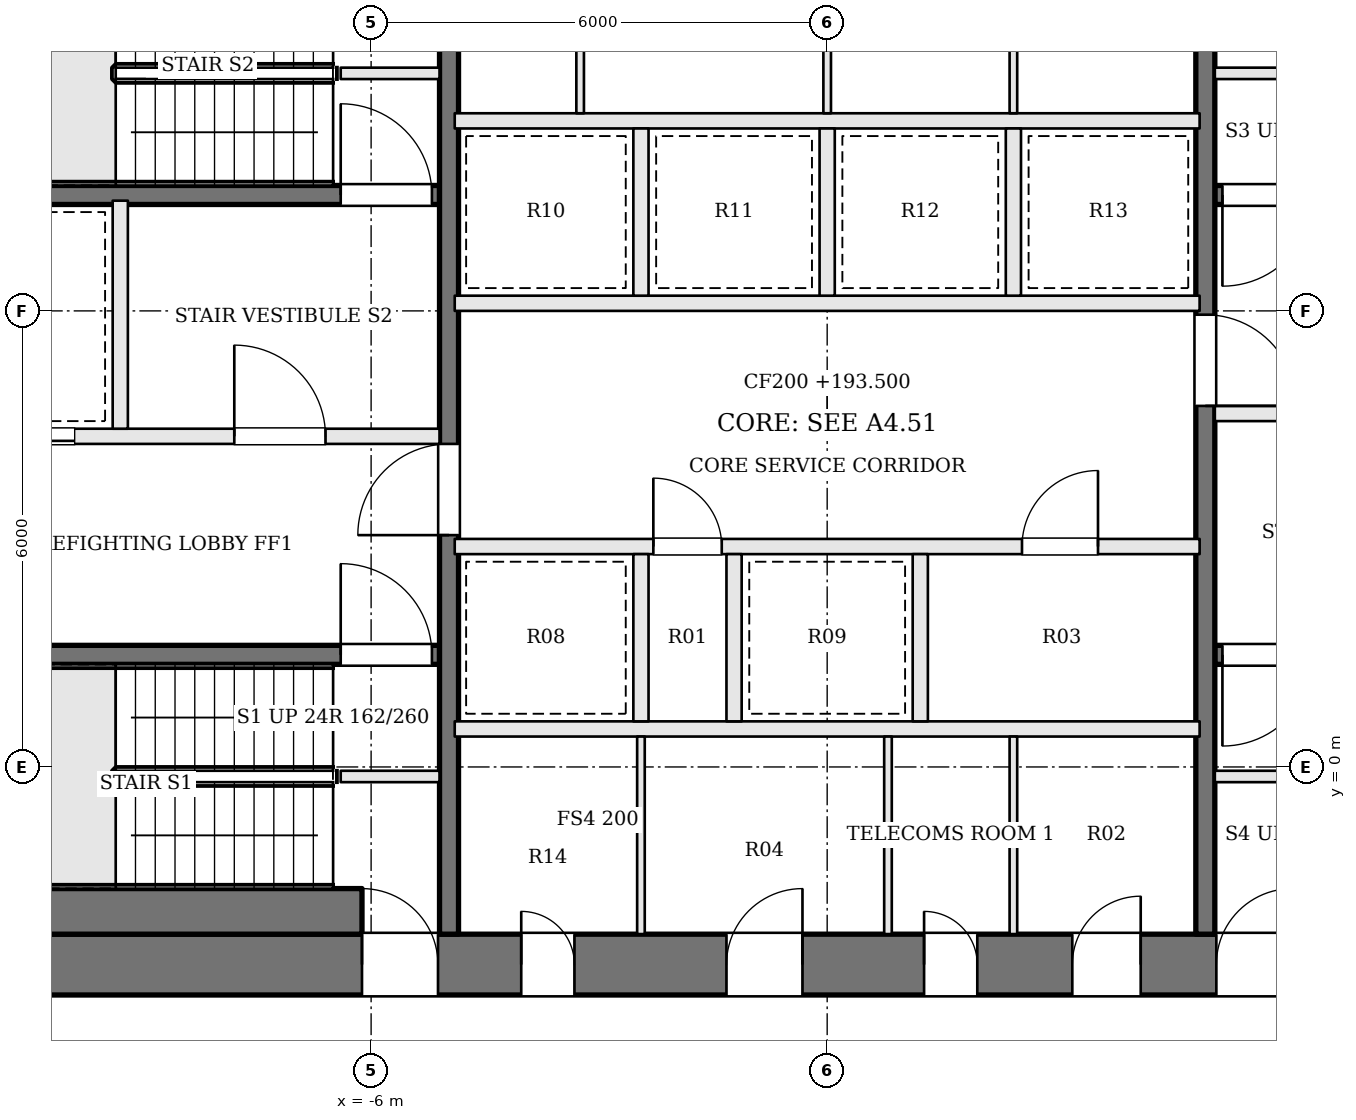
"""IFC4 building model, lengths in metres.
Left out: names, types, materials, properties, quantities, classifications, styles, units other than length and angle.
Written with IfcOpenShell. Run it as: python <this file> out.ifc"""

import sys

from ifc_helpers import new_model, si_unit, direction, frame, frame_2d, origin, place, context, subcontext, project, spatial, rectangle, extrude, element, fill, save


model = new_model("IFC4")
c1 = context("Model", 3, precision=1e-05, world=origin(), true_north=direction((0.0, 1.0)))
c2 = subcontext(c1, "Body", "Model", "MODEL_VIEW")
j1 = project(units=[si_unit("LENGTHUNIT", "METRE"), si_unit("PLANEANGLEUNIT", "RADIAN")], contexts=[c1])
p1 = place(None, origin())
s1 = spatial("IfcSite", under=j1, at=p1, CompositionType="ELEMENT")
p2 = place(p1, origin())
s2 = spatial("IfcBuilding", under=s1, at=p2, CompositionType="ELEMENT")
p3 = place(p2, frame((0.0, 0.0, 193.5)))
s3 = spatial("IfcBuildingStorey", under=s2, at=p3, CompositionType="ELEMENT", Elevation=193.5)
p4 = place(p3, frame((-13.0, -2.6, 0.0), z_axis=(0.0, 0.0, 1.0), x_axis=(1.0, 0.0, 0.0)))
e1 = element("IfcWall", 1, at=p4, inside=s3, PredefinedType="SHEAR", context=c2, shape_type="SweptSolid", body=[
    extrude(rectangle(XDim=26.0, YDim=0.8, at=frame_2d((13.0, 0.0))), origin(), (0.0, 0.0, 1.0), 3.9),
])
p5 = place(p4, frame((8.975, 0.0, 0.0)))
e2 = element("IfcOpeningElement", 2, at=p5, cuts=e1, PredefinedType="OPENING", context=c2, shape_type="SweptSolid", body=[
    extrude(rectangle(XDim=0.7, YDim=2.1, at=frame_2d((0.35, 1.05))), frame((0.0, 0.41, 0.0), z_axis=(0.0, -1.0, 0.0), x_axis=(1.0, 0.0, 0.0)), (0.0, 0.0, 1.0), 0.82),
])
p6 = place(p4, frame((11.675, 0.0, 0.0)))
e3 = element("IfcOpeningElement", 3, at=p6, cuts=e1, PredefinedType="OPENING", context=c2, shape_type="SweptSolid", body=[
    extrude(rectangle(XDim=1.0, YDim=2.1, at=frame_2d((0.5, 1.05))), frame((0.0, 0.41, 0.0), z_axis=(0.0, -1.0, 0.0), x_axis=(1.0, 0.0, 0.0)), (0.0, 0.0, 1.0), 0.82),
])
p7 = place(p4, frame((14.275, 0.0, 0.0)))
e4 = element("IfcOpeningElement", 4, at=p7, cuts=e1, PredefinedType="OPENING", context=c2, shape_type="SweptSolid", body=[
    extrude(rectangle(XDim=0.7, YDim=2.1, at=frame_2d((0.35, 1.05))), frame((0.0, 0.41, 0.0), z_axis=(0.0, -1.0, 0.0), x_axis=(1.0, 0.0, 0.0)), (0.0, 0.0, 1.0), 0.82),
])
p8 = place(p4, frame((16.225, 0.0, 0.0)))
e5 = element("IfcOpeningElement", 5, at=p8, cuts=e1, PredefinedType="OPENING", context=c2, shape_type="SweptSolid", body=[
    extrude(rectangle(XDim=0.9, YDim=2.1, at=frame_2d((0.45, 1.05))), frame((0.0, 0.41, 0.0), z_axis=(0.0, -1.0, 0.0), x_axis=(1.0, 0.0, 0.0)), (0.0, 0.0, 1.0), 0.82),
])
p9 = place(p4, frame((6.88, 0.0, 0.0)))
e6 = element("IfcOpeningElement", 6, at=p9, cuts=e1, PredefinedType="OPENING", context=c2, shape_type="SweptSolid", body=[
    extrude(rectangle(XDim=1.0, YDim=2.1, at=frame_2d((0.5, 1.05))), frame((0.0, 0.41, 0.0), z_axis=(0.0, -1.0, 0.0), x_axis=(1.0, 0.0, 0.0)), (0.0, 0.0, 1.0), 0.82),
])
p10 = place(p4, frame((18.12, 0.0, 0.0)))
e7 = element("IfcOpeningElement", 7, at=p10, cuts=e1, PredefinedType="OPENING", context=c2, shape_type="SweptSolid", body=[
    extrude(rectangle(XDim=1.0, YDim=2.1, at=frame_2d((0.5, 1.05))), frame((0.0, 0.41, 0.0), z_axis=(0.0, -1.0, 0.0), x_axis=(1.0, 0.0, 0.0)), (0.0, 0.0, 1.0), 0.82),
])
for number, where, z_axis, x_axis in (
    (8, (-6.4, -0.125, 0.0), (0.0, 0.0, 1.0), (1.0, 0.0, 0.0)),
    (9, (6.4, 9.125, 0.0), (0.0, 0.0, 1.0), (-1.0, 0.0, 0.0)),
    (10, (-6.4, 9.125, 0.0), (0.0, 0.0, 1.0), (1.0, 0.0, 0.0)),
    (11, (6.4, -0.125, 0.0), (0.0, 0.0, 1.0), (-1.0, 0.0, 0.0)),
):
    element("IfcWall", number, at=place(p3, frame(where, z_axis=z_axis, x_axis=x_axis)), inside=s3, PredefinedType="SOLIDWALL", context=c2, shape_type="SweptSolid", body=[
        extrude(rectangle(XDim=1.3, YDim=0.15, at=frame_2d((0.65, 0.0))), origin(), (0.0, 0.0, 1.0), 3.7),
    ])
p11 = place(p3, frame((-12.2, 1.475, 0.0), z_axis=(0.0, 0.0, 1.0), x_axis=(1.0, 0.0, 0.0)))
e12 = element("IfcWall", 12, at=p11, inside=s3, PredefinedType="SOLIDWALL", context=c2, shape_type="SweptSolid", body=[
    extrude(rectangle(XDim=7.1, YDim=0.25, at=frame_2d((3.55, 0.0))), origin(), (0.0, 0.0, 1.0), 3.7),
])
p12 = place(p11, frame((5.8, 0.0, 0.0)))
e13 = element("IfcOpeningElement", 13, at=p12, cuts=e12, PredefinedType="OPENING", context=c2, shape_type="SweptSolid", body=[
    extrude(rectangle(XDim=1.2, YDim=2.1, at=frame_2d((0.6, 1.05))), frame((0.0, 0.135, 0.0), z_axis=(0.0, -1.0, 0.0), x_axis=(1.0, 0.0, 0.0)), (0.0, 0.0, 1.0), 0.27),
])
p13 = place(p3, frame((12.2, 7.525, 0.0), z_axis=(0.0, 0.0, 1.0), x_axis=(-1.0, 0.0, 0.0)))
e14 = element("IfcWall", 14, at=p13, inside=s3, PredefinedType="SOLIDWALL", context=c2, shape_type="SweptSolid", body=[
    extrude(rectangle(XDim=7.1, YDim=0.25, at=frame_2d((3.55, 0.0))), origin(), (0.0, 0.0, 1.0), 3.7),
])
p14 = place(p13, frame((5.8, 0.0, 0.0)))
e15 = element("IfcOpeningElement", 15, at=p14, cuts=e14, PredefinedType="OPENING", context=c2, shape_type="SweptSolid", body=[
    extrude(rectangle(XDim=1.2, YDim=2.1, at=frame_2d((0.6, 1.05))), frame((0.0, 0.135, 0.0), z_axis=(0.0, -1.0, 0.0), x_axis=(1.0, 0.0, 0.0)), (0.0, 0.0, 1.0), 0.27),
])
p15 = place(p3, frame((-12.2, 4.35, 0.0), z_axis=(0.0, 0.0, 1.0), x_axis=(1.0, 0.0, 0.0)))
e16 = element("IfcWall", 16, at=p15, inside=s3, PredefinedType="SOLIDWALL", context=c2, shape_type="SweptSolid", body=[
    extrude(rectangle(XDim=7.1, YDim=0.2, at=frame_2d((3.55, 0.0))), origin(), (0.0, 0.0, 1.0), 3.7),
])
p16 = place(p15, frame((4.4, 0.0, 0.0)))
e17 = element("IfcOpeningElement", 17, at=p16, cuts=e16, PredefinedType="OPENING", context=c2, shape_type="SweptSolid", body=[
    extrude(rectangle(XDim=1.2, YDim=2.1, at=frame_2d((0.6, 1.05))), frame((0.0, 0.11, 0.0), z_axis=(0.0, -1.0, 0.0), x_axis=(1.0, 0.0, 0.0)), (0.0, 0.0, 1.0), 0.22),
])
p17 = place(p15, frame((1.1, 0.0, 0.0)))
e18 = element("IfcOpeningElement", 18, at=p17, cuts=e16, PredefinedType="OPENING", context=c2, shape_type="SweptSolid", body=[
    extrude(rectangle(XDim=1.2, YDim=2.1, at=frame_2d((0.6, 1.05))), frame((0.0, 0.11, 0.0), z_axis=(0.0, -1.0, 0.0), x_axis=(1.0, 0.0, 0.0)), (0.0, 0.0, 1.0), 0.22),
])
p18 = place(p3, frame((12.2, 4.65, 0.0), z_axis=(0.0, 0.0, 1.0), x_axis=(-1.0, 0.0, 0.0)))
e19 = element("IfcWall", 19, at=p18, inside=s3, PredefinedType="SOLIDWALL", context=c2, shape_type="SweptSolid", body=[
    extrude(rectangle(XDim=7.1, YDim=0.2, at=frame_2d((3.55, 0.0))), origin(), (0.0, 0.0, 1.0), 3.7),
])
p19 = place(p18, frame((4.4, 0.0, 0.0)))
e20 = element("IfcOpeningElement", 20, at=p19, cuts=e19, PredefinedType="OPENING", context=c2, shape_type="SweptSolid", body=[
    extrude(rectangle(XDim=1.2, YDim=2.1, at=frame_2d((0.6, 1.05))), frame((0.0, 0.11, 0.0), z_axis=(0.0, -1.0, 0.0), x_axis=(1.0, 0.0, 0.0)), (0.0, 0.0, 1.0), 0.22),
])
p20 = place(p18, frame((1.1, 0.0, 0.0)))
e21 = element("IfcOpeningElement", 21, at=p20, cuts=e19, PredefinedType="OPENING", context=c2, shape_type="SweptSolid", body=[
    extrude(rectangle(XDim=1.2, YDim=2.1, at=frame_2d((0.6, 1.05))), frame((0.0, 0.11, 0.0), z_axis=(0.0, -1.0, 0.0), x_axis=(1.0, 0.0, 0.0)), (0.0, 0.0, 1.0), 0.22),
])
p21 = place(p3, frame((-12.2, 7.525, 0.0), z_axis=(0.0, 0.0, 1.0), x_axis=(1.0, 0.0, 0.0)))
e22 = element("IfcWall", 22, at=p21, inside=s3, PredefinedType="SOLIDWALL", context=c2, shape_type="SweptSolid", body=[
    extrude(rectangle(XDim=7.1, YDim=0.25, at=frame_2d((3.55, 0.0))), origin(), (0.0, 0.0, 1.0), 3.7),
])
p22 = place(p21, frame((5.8, 0.0, 0.0)))
e23 = element("IfcOpeningElement", 23, at=p22, cuts=e22, PredefinedType="OPENING", context=c2, shape_type="SweptSolid", body=[
    extrude(rectangle(XDim=1.2, YDim=2.1, at=frame_2d((0.6, 1.05))), frame((0.0, 0.135, 0.0), z_axis=(0.0, -1.0, 0.0), x_axis=(1.0, 0.0, 0.0)), (0.0, 0.0, 1.0), 0.27),
])
p23 = place(p3, frame((12.2, 1.475, 0.0), z_axis=(0.0, 0.0, 1.0), x_axis=(-1.0, 0.0, 0.0)))
e24 = element("IfcWall", 24, at=p23, inside=s3, PredefinedType="SOLIDWALL", context=c2, shape_type="SweptSolid", body=[
    extrude(rectangle(XDim=7.1, YDim=0.25, at=frame_2d((3.55, 0.0))), origin(), (0.0, 0.0, 1.0), 3.7),
])
p24 = place(p23, frame((5.8, 0.0, 0.0)))
e25 = element("IfcOpeningElement", 25, at=p24, cuts=e24, PredefinedType="OPENING", context=c2, shape_type="SweptSolid", body=[
    extrude(rectangle(XDim=1.2, YDim=2.1, at=frame_2d((0.6, 1.05))), frame((0.0, 0.135, 0.0), z_axis=(0.0, -1.0, 0.0), x_axis=(1.0, 0.0, 0.0)), (0.0, 0.0, 1.0), 0.27),
])
p25 = place(p3, frame((-9.3, 4.45, 0.0), z_axis=(0.0, 0.0, 1.0), x_axis=(0.0, 1.0, 0.0)))
e26 = element("IfcWall", 26, at=p25, inside=s3, PredefinedType="SOLIDWALL", context=c2, shape_type="SweptSolid", body=[
    extrude(rectangle(XDim=3.0, YDim=0.2, at=frame_2d((1.5, 0.0))), origin(), (0.0, 0.0, 1.0), 3.7),
])
p26 = place(p3, frame((-4.975, -2.2, 0.0), z_axis=(0.0, 0.0, 1.0), x_axis=(0.0, 1.0, 0.0)))
e27 = element("IfcWall", 27, at=p26, inside=s3, PredefinedType="SOLIDWALL", context=c2, shape_type="SweptSolid", body=[
    extrude(rectangle(XDim=13.4, YDim=0.25, at=frame_2d((6.7, 0.0))), origin(), (0.0, 0.0, 1.0), 3.7),
])
p27 = place(p26, frame((5.25, 0.0, 0.0)))
e28 = element("IfcOpeningElement", 28, at=p27, cuts=e27, PredefinedType="OPENING", context=c2, shape_type="SweptSolid", body=[
    extrude(rectangle(XDim=1.2, YDim=2.1, at=frame_2d((0.6, 1.05))), frame((0.0, 0.135, 0.0), z_axis=(0.0, -1.0, 0.0), x_axis=(1.0, 0.0, 0.0)), (0.0, 0.0, 1.0), 0.27),
])
p28 = place(p3, frame((4.975, 11.2, 0.0), z_axis=(0.0, 0.0, 1.0), x_axis=(0.0, -1.0, 0.0)))
e29 = element("IfcWall", 29, at=p28, inside=s3, PredefinedType="SOLIDWALL", context=c2, shape_type="SweptSolid", body=[
    extrude(rectangle(XDim=13.4, YDim=0.25, at=frame_2d((6.7, 0.0))), origin(), (0.0, 0.0, 1.0), 3.7),
])
p29 = place(p28, frame((5.25, 0.0, 0.0)))
e30 = element("IfcOpeningElement", 30, at=p29, cuts=e29, PredefinedType="OPENING", context=c2, shape_type="SweptSolid", body=[
    extrude(rectangle(XDim=1.2, YDim=2.1, at=frame_2d((0.6, 1.05))), frame((0.0, 0.135, 0.0), z_axis=(0.0, -1.0, 0.0), x_axis=(1.0, 0.0, 0.0)), (0.0, 0.0, 1.0), 0.27),
])
p30 = place(p3, frame((-12.2, -1.9, 0.0), z_axis=(0.0, 0.0, 1.0), x_axis=(1.0, 0.0, 0.0)))
e31 = element("IfcWall", 31, at=p30, inside=s3, PredefinedType="SOLIDWALL", context=c2, shape_type="SweptSolid", body=[
    extrude(rectangle(XDim=6.08, YDim=0.6, at=frame_2d((3.04, 0.0))), origin(), (0.0, 0.0, 1.0), 3.7),
])
p31 = place(p3, frame((-4.9, 0.5, 0.0), z_axis=(0.0, 0.0, 1.0), x_axis=(1.0, 0.0, 0.0)))
e32 = element("IfcWall", 32, at=p31, inside=s3, PredefinedType="SOLIDWALL", context=c2, shape_type="SweptSolid", body=[
    extrude(rectangle(XDim=9.8, YDim=0.2, at=frame_2d((4.9, 0.0))), origin(), (0.0, 0.0, 1.0), 3.7),
])
p32 = place(p3, frame((-4.9, 2.9, 0.0), z_axis=(0.0, 0.0, 1.0), x_axis=(1.0, 0.0, 0.0)))
e33 = element("IfcWall", 33, at=p32, inside=s3, PredefinedType="SOLIDWALL", context=c2, shape_type="SweptSolid", body=[
    extrude(rectangle(XDim=9.8, YDim=0.2, at=frame_2d((4.9, 0.0))), origin(), (0.0, 0.0, 1.0), 3.7),
])
p33 = place(p32, frame((2.613, 0.0, 0.0)))
e34 = element("IfcOpeningElement", 34, at=p33, cuts=e33, PredefinedType="OPENING", context=c2, shape_type="SweptSolid", body=[
    extrude(rectangle(XDim=0.9, YDim=2.1, at=frame_2d((0.45, 1.05))), frame((0.0, 0.11, 0.0), z_axis=(0.0, -1.0, 0.0), x_axis=(1.0, 0.0, 0.0)), (0.0, 0.0, 1.0), 0.22),
])
p34 = place(p32, frame((7.463, 0.0, 0.0)))
e35 = element("IfcOpeningElement", 35, at=p34, cuts=e33, PredefinedType="OPENING", context=c2, shape_type="SweptSolid", body=[
    extrude(rectangle(XDim=1.0, YDim=2.1, at=frame_2d((0.5, 1.05))), frame((0.0, 0.11, 0.0), z_axis=(0.0, -1.0, 0.0), x_axis=(1.0, 0.0, 0.0)), (0.0, 0.0, 1.0), 0.22),
])
for number, where, z_axis, x_axis in (
    (36, (-4.9, 6.1, 0.0), (0.0, 0.0, 1.0), (1.0, 0.0, 0.0)),
    (37, (-4.9, 8.5, 0.0), (0.0, 0.0, 1.0), (1.0, 0.0, 0.0)),
):
    element("IfcWall", number, at=place(p3, frame(where, z_axis=z_axis, x_axis=x_axis)), inside=s3, PredefinedType="SOLIDWALL", context=c2, shape_type="SweptSolid", body=[
        extrude(rectangle(XDim=9.8, YDim=0.2, at=frame_2d((4.9, 0.0))), origin(), (0.0, 0.0, 1.0), 3.7),
    ])
for number, where, z_axis, x_axis in (
    (38, (-2.45, 0.6, 0.0), (0.0, 0.0, 1.0), (0.0, 1.0, 0.0)),
    (39, (-1.225, 0.6, 0.0), (0.0, 0.0, 1.0), (0.0, 1.0, 0.0)),
    (40, (1.225, 0.6, 0.0), (0.0, 0.0, 1.0), (0.0, 1.0, 0.0)),
    (41, (-2.45, 6.2, 0.0), (0.0, 0.0, 1.0), (0.0, 1.0, 0.0)),
    (42, (0.0, 6.2, 0.0), (0.0, 0.0, 1.0), (0.0, 1.0, 0.0)),
    (43, (2.45, 6.2, 0.0), (0.0, 0.0, 1.0), (0.0, 1.0, 0.0)),
):
    element("IfcWall", number, at=place(p3, frame(where, z_axis=z_axis, x_axis=x_axis)), inside=s3, PredefinedType="SOLIDWALL", context=c2, shape_type="SweptSolid", body=[
        extrude(rectangle(XDim=2.2, YDim=0.2, at=frame_2d((1.1, 0.0))), origin(), (0.0, 0.0, 1.0), 3.7),
    ])
for number, where, z_axis, x_axis in (
    (44, (-2.45, -2.2, 0.0), (0.0, 0.0, 1.0), (0.0, 1.0, 0.0)),
    (45, (0.8, -2.2, 0.0), (0.0, 0.0, 1.0), (0.0, 1.0, 0.0)),
    (46, (2.45, -2.2, 0.0), (0.0, 0.0, 1.0), (0.0, 1.0, 0.0)),
    (47, (-3.25, 8.6, 0.0), (0.0, 0.0, 1.0), (0.0, 1.0, 0.0)),
    (48, (0.0, 8.6, 0.0), (0.0, 0.0, 1.0), (0.0, 1.0, 0.0)),
    (49, (2.45, 8.6, 0.0), (0.0, 0.0, 1.0), (0.0, 1.0, 0.0)),
):
    element("IfcWall", number, at=place(p3, frame(where, z_axis=z_axis, x_axis=x_axis)), inside=s3, PredefinedType="PARTITIONING", context=c2, shape_type="SweptSolid", body=[
        extrude(rectangle(XDim=2.6, YDim=0.1, at=frame_2d((1.3, 0.0))), origin(), (0.0, 0.0, 1.0), 3.7),
    ])
p35 = place(p27, origin())
e50 = element("IfcDoor", 50, at=p35, inside=s3, OperationType="SINGLE_SWING_LEFT", PredefinedType="DOOR", context=c2, shape_type="SweptSolid", body=[
    extrude(rectangle(XDim=1.2, YDim=2.1, at=frame_2d((0.6, 1.05))), frame((0.0, 0.025, 0.0), z_axis=(0.0, -1.0, 0.0), x_axis=(1.0, 0.0, 0.0)), (0.0, 0.0, 1.0), 0.05),
])
fill(e28, e50)
p36 = place(p29, origin())
e51 = element("IfcDoor", 51, at=p36, inside=s3, OperationType="SINGLE_SWING_RIGHT", PredefinedType="DOOR", context=c2, shape_type="SweptSolid", body=[
    extrude(rectangle(XDim=1.2, YDim=2.1, at=frame_2d((0.6, 1.05))), frame((0.0, 0.025, 0.0), z_axis=(0.0, -1.0, 0.0), x_axis=(1.0, 0.0, 0.0)), (0.0, 0.0, 1.0), 0.05),
])
fill(e30, e51)
p37 = place(p16, origin())
e52 = element("IfcDoor", 52, at=p37, inside=s3, OperationType="SINGLE_SWING_LEFT", PredefinedType="DOOR", context=c2, shape_type="SweptSolid", body=[
    extrude(rectangle(XDim=1.2, YDim=2.1, at=frame_2d((0.6, 1.05))), frame((0.0, 0.025, 0.0), z_axis=(0.0, -1.0, 0.0), x_axis=(1.0, 0.0, 0.0)), (0.0, 0.0, 1.0), 0.05),
])
fill(e17, e52)
p38 = place(p12, origin())
e53 = element("IfcDoor", 53, at=p38, inside=s3, OperationType="SINGLE_SWING_LEFT", PredefinedType="DOOR", context=c2, shape_type="SweptSolid", body=[
    extrude(rectangle(XDim=1.2, YDim=2.1, at=frame_2d((0.6, 1.05))), frame((0.0, 0.025, 0.0), z_axis=(0.0, -1.0, 0.0), x_axis=(1.0, 0.0, 0.0)), (0.0, 0.0, 1.0), 0.05),
])
fill(e13, e53)
p39 = place(p14, origin())
e54 = element("IfcDoor", 54, at=p39, inside=s3, OperationType="SINGLE_SWING_RIGHT", PredefinedType="DOOR", context=c2, shape_type="SweptSolid", body=[
    extrude(rectangle(XDim=1.2, YDim=2.1, at=frame_2d((0.6, 1.05))), frame((0.0, 0.025, 0.0), z_axis=(0.0, -1.0, 0.0), x_axis=(1.0, 0.0, 0.0)), (0.0, 0.0, 1.0), 0.05),
])
fill(e15, e54)
p40 = place(p22, origin())
e55 = element("IfcDoor", 55, at=p40, inside=s3, OperationType="SINGLE_SWING_LEFT", PredefinedType="DOOR", context=c2, shape_type="SweptSolid", body=[
    extrude(rectangle(XDim=1.2, YDim=2.1, at=frame_2d((0.6, 1.05))), frame((0.0, 0.025, 0.0), z_axis=(0.0, -1.0, 0.0), x_axis=(1.0, 0.0, 0.0)), (0.0, 0.0, 1.0), 0.05),
])
fill(e23, e55)
p41 = place(p24, origin())
e56 = element("IfcDoor", 56, at=p41, inside=s3, OperationType="SINGLE_SWING_RIGHT", PredefinedType="DOOR", context=c2, shape_type="SweptSolid", body=[
    extrude(rectangle(XDim=1.2, YDim=2.1, at=frame_2d((0.6, 1.05))), frame((0.0, 0.025, 0.0), z_axis=(0.0, -1.0, 0.0), x_axis=(1.0, 0.0, 0.0)), (0.0, 0.0, 1.0), 0.05),
])
fill(e25, e56)
p42 = place(p17, origin())
e57 = element("IfcDoor", 57, at=p42, inside=s3, OperationType="SLIDING_TO_RIGHT", PredefinedType="DOOR", context=c2, shape_type="SweptSolid", body=[
    extrude(rectangle(XDim=1.2, YDim=2.1, at=frame_2d((0.6, 1.05))), frame((0.0, 0.025, 0.0), z_axis=(0.0, -1.0, 0.0), x_axis=(1.0, 0.0, 0.0)), (0.0, 0.0, 1.0), 0.05),
])
fill(e18, e57)
p43 = place(p33, origin())
e58 = element("IfcDoor", 58, at=p43, inside=s3, OperationType="SINGLE_SWING_LEFT", PredefinedType="DOOR", context=c2, shape_type="SweptSolid", body=[
    extrude(rectangle(XDim=0.9, YDim=2.1, at=frame_2d((0.45, 1.05))), frame((0.0, 0.025, 0.0), z_axis=(0.0, -1.0, 0.0), x_axis=(1.0, 0.0, 0.0)), (0.0, 0.0, 1.0), 0.05),
])
fill(e34, e58)
p44 = place(p34, origin())
e59 = element("IfcDoor", 59, at=p44, inside=s3, OperationType="SINGLE_SWING_RIGHT", PredefinedType="DOOR", context=c2, shape_type="SweptSolid", body=[
    extrude(rectangle(XDim=1.0, YDim=2.1, at=frame_2d((0.5, 1.05))), frame((0.0, 0.025, 0.0), z_axis=(0.0, -1.0, 0.0), x_axis=(1.0, 0.0, 0.0)), (0.0, 0.0, 1.0), 0.05),
])
fill(e35, e59)
p45 = place(p5, origin())
e60 = element("IfcDoor", 60, at=p45, inside=s3, OperationType="SINGLE_SWING_LEFT", PredefinedType="DOOR", context=c2, shape_type="SweptSolid", body=[
    extrude(rectangle(XDim=0.7, YDim=2.1, at=frame_2d((0.35, 1.05))), frame((0.0, 0.025, 0.0), z_axis=(0.0, -1.0, 0.0), x_axis=(1.0, 0.0, 0.0)), (0.0, 0.0, 1.0), 0.05),
])
fill(e2, e60)
p46 = place(p6, origin())
e61 = element("IfcDoor", 61, at=p46, inside=s3, OperationType="SINGLE_SWING_RIGHT", PredefinedType="DOOR", context=c2, shape_type="SweptSolid", body=[
    extrude(rectangle(XDim=1.0, YDim=2.1, at=frame_2d((0.5, 1.05))), frame((0.0, 0.025, 0.0), z_axis=(0.0, -1.0, 0.0), x_axis=(1.0, 0.0, 0.0)), (0.0, 0.0, 1.0), 0.05),
])
fill(e3, e61)
p47 = place(p7, origin())
e62 = element("IfcDoor", 62, at=p47, inside=s3, OperationType="SINGLE_SWING_LEFT", PredefinedType="DOOR", context=c2, shape_type="SweptSolid", body=[
    extrude(rectangle(XDim=0.7, YDim=2.1, at=frame_2d((0.35, 1.05))), frame((0.0, 0.025, 0.0), z_axis=(0.0, -1.0, 0.0), x_axis=(1.0, 0.0, 0.0)), (0.0, 0.0, 1.0), 0.05),
])
fill(e4, e62)
p48 = place(p8, origin())
e63 = element("IfcDoor", 63, at=p48, inside=s3, OperationType="SINGLE_SWING_RIGHT", PredefinedType="DOOR", context=c2, shape_type="SweptSolid", body=[
    extrude(rectangle(XDim=0.9, YDim=2.1, at=frame_2d((0.45, 1.05))), frame((0.0, 0.025, 0.0), z_axis=(0.0, -1.0, 0.0), x_axis=(1.0, 0.0, 0.0)), (0.0, 0.0, 1.0), 0.05),
])
fill(e5, e63)
p49 = place(p9, origin())
e64 = element("IfcDoor", 64, at=p49, inside=s3, OperationType="SINGLE_SWING_LEFT", PredefinedType="DOOR", context=c2, shape_type="SweptSolid", body=[
    extrude(rectangle(XDim=1.0, YDim=2.1, at=frame_2d((0.5, 1.05))), frame((0.0, 0.025, 0.0), z_axis=(0.0, -1.0, 0.0), x_axis=(1.0, 0.0, 0.0)), (0.0, 0.0, 1.0), 0.05),
])
fill(e6, e64)
p50 = place(p10, origin())
e65 = element("IfcDoor", 65, at=p50, inside=s3, OperationType="SINGLE_SWING_RIGHT", PredefinedType="DOOR", context=c2, shape_type="SweptSolid", body=[
    extrude(rectangle(XDim=1.0, YDim=2.1, at=frame_2d((0.5, 1.05))), frame((0.0, 0.025, 0.0), z_axis=(0.0, -1.0, 0.0), x_axis=(1.0, 0.0, 0.0)), (0.0, 0.0, 1.0), 0.05),
])
fill(e7, e65)
save(model, sys.argv[1])
